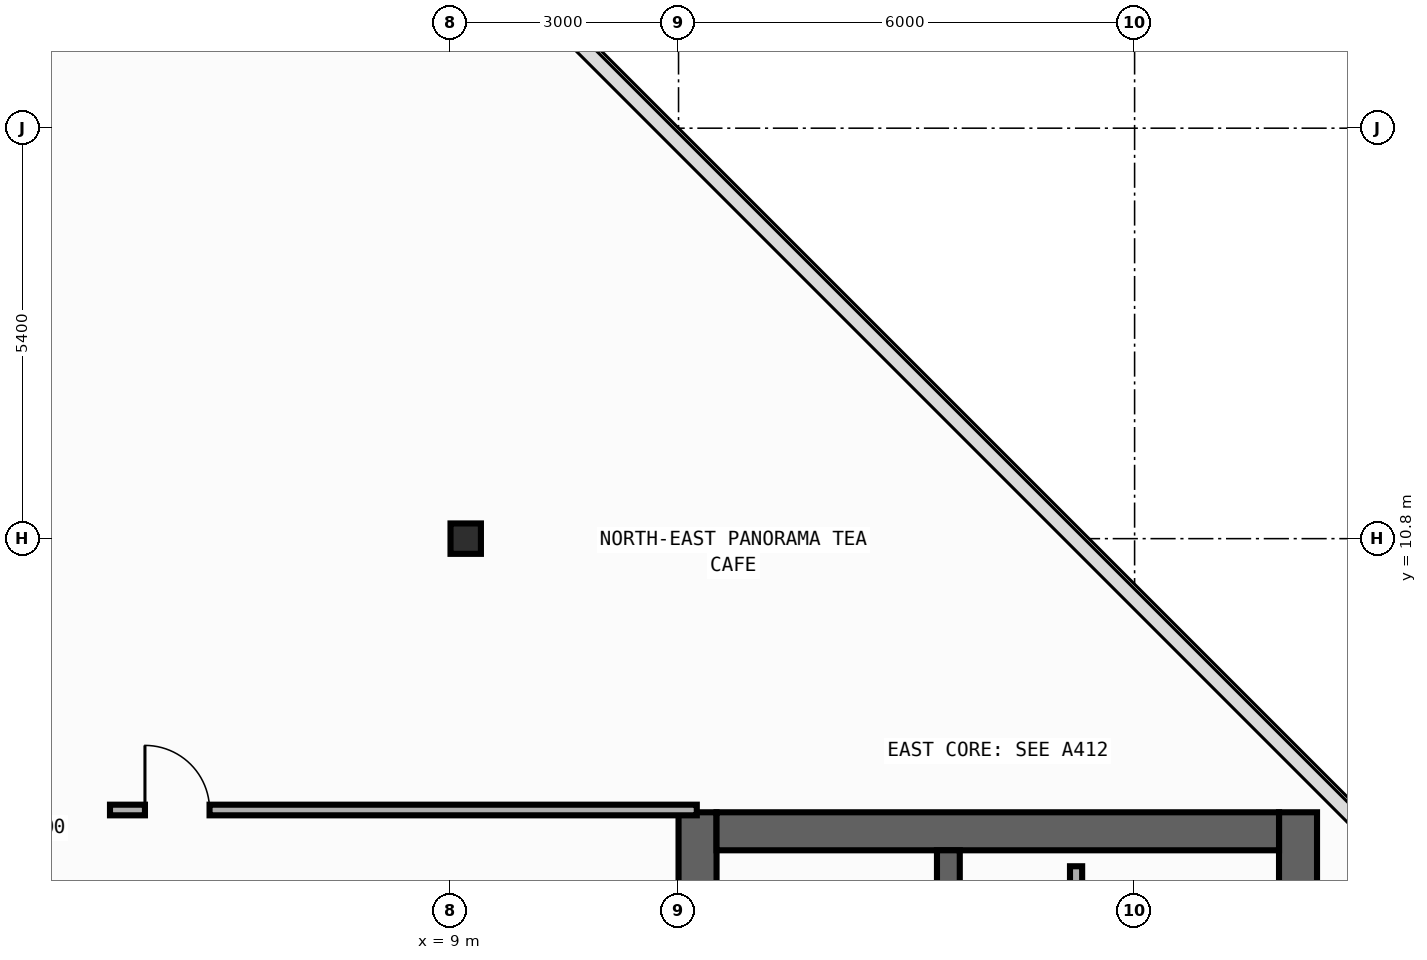
"""IFC4 building model, lengths in metres.
Left out: names, types, materials, properties, quantities, classifications, styles, units other than length and angle.
Written with IfcOpenShell. Run it as: python <this file> out.ifc"""

import sys

from ifc_helpers import new_model, si_unit, direction, frame, frame_2d, origin, origin_2d, place, context, subcontext, project, spatial, rectangle, i_section, extrude, element, fill, save


model = new_model("IFC4")
c1 = context("Model", 3, precision=1e-05, world=origin(), true_north=direction((0.0, 1.0)))
c2 = subcontext(c1, "Body", "Model", "MODEL_VIEW")
j1 = project(units=[si_unit("LENGTHUNIT", "METRE"), si_unit("PLANEANGLEUNIT", "RADIAN")], contexts=[c1])
p1 = place(None, origin())
s1 = spatial("IfcSite", under=j1, at=p1, CompositionType="ELEMENT")
p2 = place(p1, origin())
s2 = spatial("IfcBuilding", under=s1, at=p2, CompositionType="ELEMENT")
p3 = place(p2, frame((0.0, 0.0, 320.4)))
s3 = spatial("IfcBuildingStorey", under=s2, at=p3, CompositionType="ELEMENT", Elevation=320.4)
p4 = place(p3, frame((12.25, -19.8, 0.0), z_axis=(0.0, 0.0, 1.0), x_axis=(0.0, 1.0, 0.0)))
e1 = element("IfcWall", 1, at=p4, inside=s3, PredefinedType="SHEAR", context=c2, shape_type="SweptSolid", body=[
    extrude(rectangle(XDim=27.0, YDim=0.5, at=frame_2d((13.5, 0.0))), origin(), (0.0, 0.0, 1.0), 4.45),
])
p5 = place(p4, frame((23.05, 0.0, 0.0)))
e2 = element("IfcOpeningElement", 2, at=p5, cuts=e1, PredefinedType="OPENING", context=c2, shape_type="SweptSolid", body=[
    extrude(rectangle(XDim=1.1, YDim=2.2, at=frame_2d((0.55, 1.1))), frame((0.0, 0.26, 0.0), z_axis=(0.0, -1.0, 0.0), x_axis=(1.0, 0.0, 0.0)), (0.0, 0.0, 1.0), 0.52),
])
p6 = place(p4, frame((19.85, 0.0, 0.0)))
e3 = element("IfcOpeningElement", 3, at=p6, cuts=e1, PredefinedType="OPENING", context=c2, shape_type="SweptSolid", body=[
    extrude(rectangle(XDim=1.1, YDim=2.2, at=frame_2d((0.55, 1.1))), frame((0.0, 0.26, 0.0), z_axis=(0.0, -1.0, 0.0), x_axis=(1.0, 0.0, 0.0)), (0.0, 0.0, 1.0), 0.52),
])
p7 = place(p4, frame((16.65, 0.0, 0.0)))
e4 = element("IfcOpeningElement", 4, at=p7, cuts=e1, PredefinedType="OPENING", context=c2, shape_type="SweptSolid", body=[
    extrude(rectangle(XDim=1.1, YDim=2.2, at=frame_2d((0.55, 1.1))), frame((0.0, 0.26, 0.0), z_axis=(0.0, -1.0, 0.0), x_axis=(1.0, 0.0, 0.0)), (0.0, 0.0, 1.0), 0.52),
])
p8 = place(p4, frame((10.175, 0.0, 0.0)))
e5 = element("IfcOpeningElement", 5, at=p8, cuts=e1, PredefinedType="OPENING", context=c2, shape_type="SweptSolid", body=[
    extrude(rectangle(XDim=0.85, YDim=2.1, at=frame_2d((0.425, 1.05))), frame((0.0, 0.26, 0.0), z_axis=(0.0, -1.0, 0.0), x_axis=(1.0, 0.0, 0.0)), (0.0, 0.0, 1.0), 0.52),
])
p9 = place(p4, frame((12.725, 0.0, 0.0)))
e6 = element("IfcOpeningElement", 6, at=p9, cuts=e1, PredefinedType="OPENING", context=c2, shape_type="SweptSolid", body=[
    extrude(rectangle(XDim=1.15, YDim=2.2, at=frame_2d((0.575, 1.1))), frame((0.0, 0.26, 0.0), z_axis=(0.0, -1.0, 0.0), x_axis=(1.0, 0.0, 0.0)), (0.0, 0.0, 1.0), 0.52),
])
p10 = place(p4, frame((25.125, 0.0, 0.0)))
e7 = element("IfcOpeningElement", 7, at=p10, cuts=e1, PredefinedType="OPENING", context=c2, shape_type="SweptSolid", body=[
    extrude(rectangle(XDim=0.85, YDim=2.1, at=frame_2d((0.425, 1.05))), frame((0.0, 0.26, 0.0), z_axis=(0.0, -1.0, 0.0), x_axis=(1.0, 0.0, 0.0)), (0.0, 0.0, 1.0), 0.52),
])
p11 = place(p3, frame((20.15, -19.8, 0.0), z_axis=(0.0, 0.0, 1.0), x_axis=(0.0, 1.0, 0.0)))
e8 = element("IfcWall", 8, at=p11, inside=s3, PredefinedType="SHEAR", context=c2, shape_type="SweptSolid", body=[
    extrude(rectangle(XDim=27.0, YDim=0.5, at=frame_2d((13.5, 0.0))), origin(), (0.0, 0.0, 1.0), 4.45),
])
p12 = place(p3, frame((12.5, 6.95, 0.0), z_axis=(0.0, 0.0, 1.0), x_axis=(1.0, 0.0, 0.0)))
e9 = element("IfcWall", 9, at=p12, inside=s3, PredefinedType="SHEAR", context=c2, shape_type="SweptSolid", body=[
    extrude(rectangle(XDim=7.4, YDim=0.5, at=frame_2d((3.7, 0.0))), origin(), (0.0, 0.0, 1.0), 4.45),
])
p13 = place(p3, frame((15.55, -19.3, 0.0), z_axis=(0.0, 0.0, 1.0), x_axis=(0.0, 1.0, 0.0)))
e10 = element("IfcWall", 10, at=p13, inside=s3, PredefinedType="SHEAR", context=c2, shape_type="SweptSolid", body=[
    extrude(rectangle(XDim=26.0, YDim=0.3, at=frame_2d((13.0, 0.0))), origin(), (0.0, 0.0, 1.0), 4.45),
])
p14 = place(p13, frame((12.225, 0.0, 0.0)))
e11 = element("IfcOpeningElement", 11, at=p14, cuts=e10, PredefinedType="OPENING", context=c2, shape_type="SweptSolid", body=[
    extrude(rectangle(XDim=1.15, YDim=2.2, at=frame_2d((0.575, 1.1))), frame((0.0, 0.16, 0.0), z_axis=(0.0, -1.0, 0.0), x_axis=(1.0, 0.0, 0.0)), (0.0, 0.0, 1.0), 0.32),
])
p15 = place(p13, frame((24.625, 0.0, 0.0)))
e12 = element("IfcOpeningElement", 12, at=p15, cuts=e10, PredefinedType="OPENING", context=c2, shape_type="SweptSolid", body=[
    extrude(rectangle(XDim=0.85, YDim=2.1, at=frame_2d((0.425, 1.05))), frame((0.0, 0.16, 0.0), z_axis=(0.0, -1.0, 0.0), x_axis=(1.0, 0.0, 0.0)), (0.0, 0.0, 1.0), 0.32),
])
p16 = place(p3, frame((9.2, 10.8, 0.0), z_axis=(0.0, 0.0, 1.0), x_axis=(1.0, 0.0, 0.0)))
e13 = element("IfcColumn", 13, at=p16, inside=s3, PredefinedType="COLUMN", context=c2, shape_type="SweptSolid", body=[
    extrude(i_section(OverallWidth=0.4, OverallDepth=0.4, WebThickness=0.013, FlangeThickness=0.021, FilletRadius=0.022, at=origin_2d()), origin(), (0.0, 0.0, 1.0), 4.8),
])
p17 = place(p3, frame((17.23, 4.17, 0.0), z_axis=(0.0, 0.0, 1.0), x_axis=(0.0, 1.0, 0.0)))
e14 = element("IfcWall", 14, at=p17, inside=s3, PredefinedType="PARTITIONING", context=c2, shape_type="SweptSolid", body=[
    extrude(rectangle(XDim=2.32, YDim=0.16, at=frame_2d((1.16, 0.0))), origin(), (0.0, 0.0, 1.0), 4.45),
])
p18 = place(p17, frame((0.46, 0.0, 0.0)))
e15 = element("IfcOpeningElement", 15, at=p18, cuts=e14, PredefinedType="OPENING", context=c2, shape_type="SweptSolid", body=[
    extrude(rectangle(XDim=0.85, YDim=2.1, at=frame_2d((0.425, 1.05))), frame((0.0, 0.09, 0.0), z_axis=(0.0, -1.0, 0.0), x_axis=(1.0, 0.0, 0.0)), (0.0, 0.0, 1.0), 0.18),
])
p19 = place(p3, frame((4.52, 7.23, 0.0), z_axis=(0.0, 0.0, 1.0), x_axis=(1.0, 0.0, 0.0)))
e16 = element("IfcWall", 16, at=p19, inside=s3, PredefinedType="PARTITIONING", context=c2, shape_type="SweptSolid", body=[
    extrude(rectangle(XDim=7.72, YDim=0.14, at=frame_2d((3.86, 0.0))), origin(), (0.0, 0.0, 1.0), 3.55),
])
p20 = place(p19, frame((0.46, 0.0, 0.0)))
e17 = element("IfcOpeningElement", 17, at=p20, cuts=e16, PredefinedType="OPENING", context=c2, shape_type="SweptSolid", body=[
    extrude(rectangle(XDim=0.85, YDim=2.1, at=frame_2d((0.425, 1.05))), frame((0.0, 0.08, 0.0), z_axis=(0.0, -1.0, 0.0), x_axis=(1.0, 0.0, 0.0)), (0.0, 0.0, 1.0), 0.16),
])
p21 = place(p20, origin())
e18 = element("IfcDoor", 18, at=p21, inside=s3, OperationType="SINGLE_SWING_LEFT", PredefinedType="DOOR", context=c2, shape_type="SweptSolid", body=[
    extrude(rectangle(XDim=0.85, YDim=2.1, at=frame_2d((0.425, 1.05))), frame((0.0, 0.025, 0.0), z_axis=(0.0, -1.0, 0.0), x_axis=(1.0, 0.0, 0.0)), (0.0, 0.0, 1.0), 0.05),
])
fill(e17, e18)
save(model, sys.argv[1])
